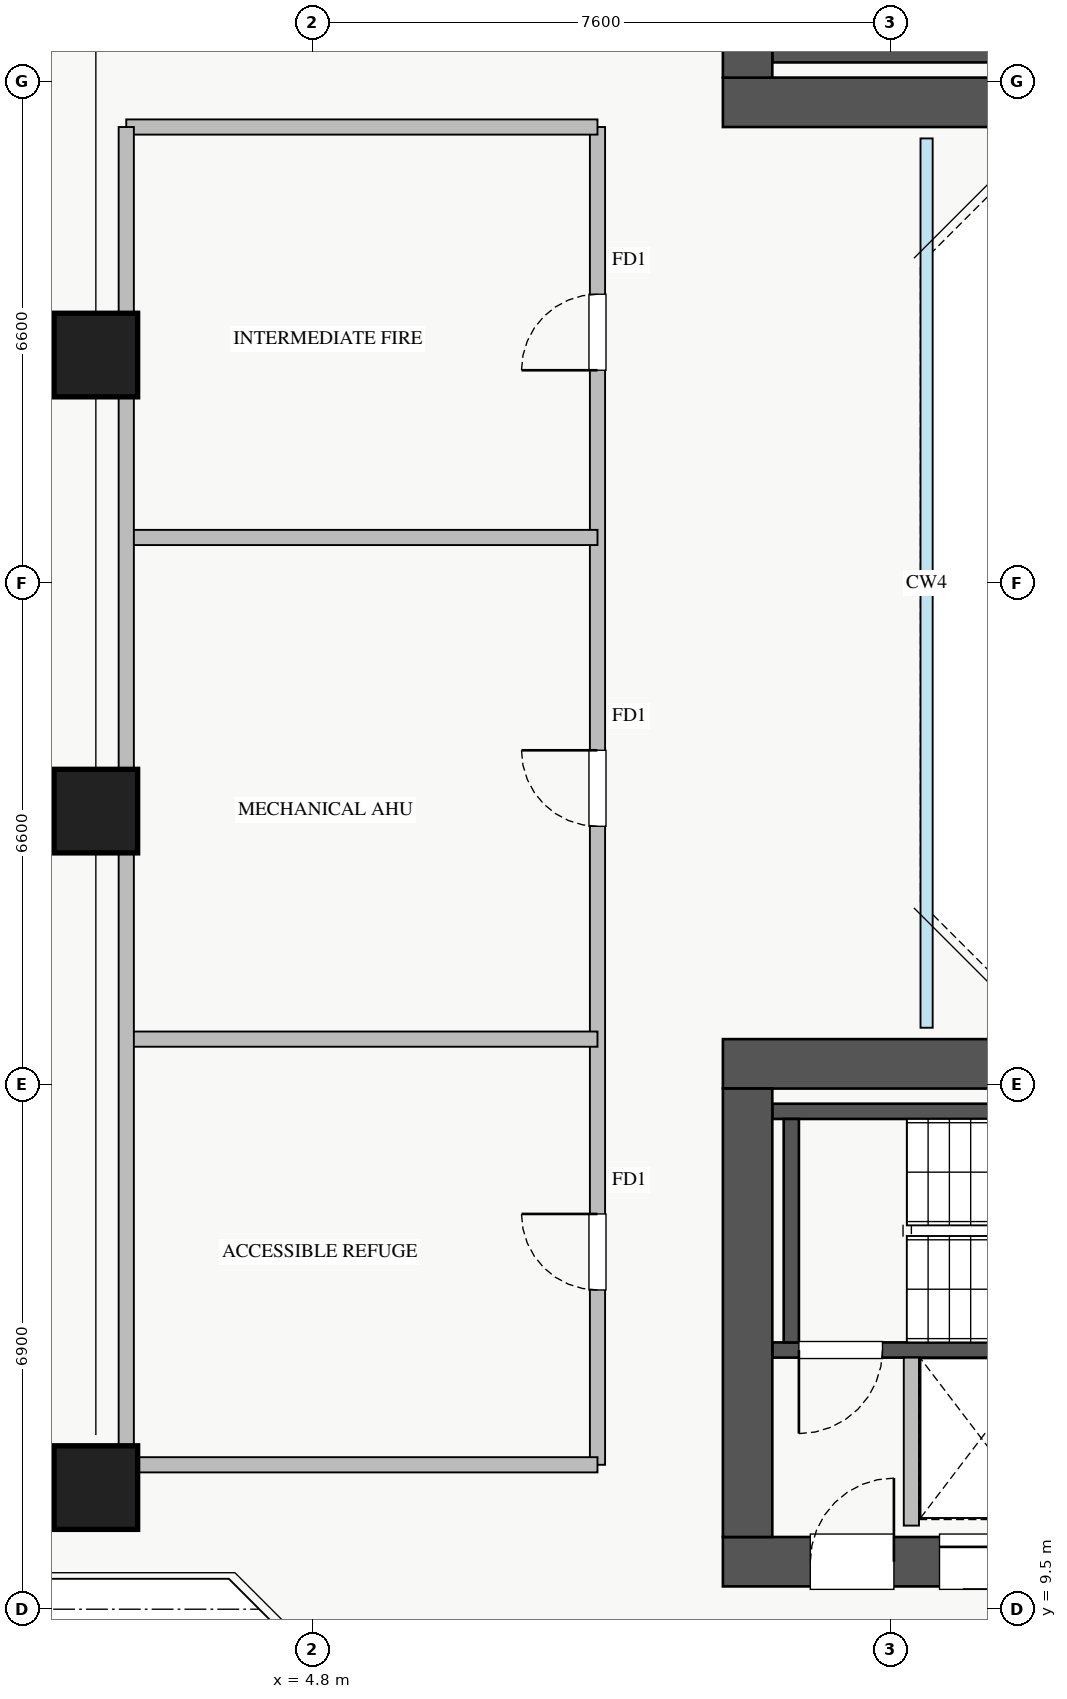
"""IFC4 building model, lengths in metres.
Left out: names, types, materials, properties, quantities, classifications, styles, units other than length and angle.
Written with IfcOpenShell. Run it as: python <this file> out.ifc"""

import sys

from ifc_helpers import new_model, si_unit, direction, frame, frame_2d, origin, origin_2d, place, context, subcontext, project, spatial, rectangle, extrude, source, transform, mapped, element, fill, save


model = new_model("IFC4")
c1 = context("Model", 3, precision=1e-05, world=origin(), true_north=direction((0.0, 1.0)))
c2 = subcontext(c1, "Body", "Model", "MODEL_VIEW")
j1 = project(units=[si_unit("LENGTHUNIT", "METRE"), si_unit("PLANEANGLEUNIT", "RADIAN")], contexts=[c1])
p1 = place(None, origin())
s1 = spatial("IfcSite", under=j1, at=p1, CompositionType="ELEMENT")
p2 = place(p1, origin())
s2 = spatial("IfcBuilding", under=s1, at=p2, CompositionType="ELEMENT")
p3 = place(p2, frame((0.0, 0.0, 139.25)))
s3 = spatial("IfcBuildingStorey", under=s2, at=p3, CompositionType="ELEMENT", Elevation=139.25)
p4 = place(p3, frame((12.68, 12.8, 0.0), z_axis=(0.0, 0.0, 1.0), x_axis=(1.0, 0.0, 0.0)))
e1 = element("IfcWall", 1, at=p4, inside=s3, PredefinedType="SHEAR", context=c2, shape_type="SweptSolid", body=[
    extrude(rectangle(XDim=1.94, YDim=0.18, at=frame_2d((0.97, 0.0))), origin(), (0.0, 0.0, 1.0), 4.32),
])
p5 = place(p3, frame((10.85, 29.95, 0.0), z_axis=(0.0, 0.0, 1.0), x_axis=(1.0, 0.0, 0.0)))
e2 = element("IfcWall", 2, at=p5, inside=s3, PredefinedType="SHEAR", context=c2, shape_type="SweptSolid", body=[
    extrude(rectangle(XDim=7.3, YDim=0.2, at=frame_2d((3.65, 0.0))), origin(), (0.0, 0.0, 1.0), 4.5),
])
p6 = place(p3, frame((10.85, 12.91, 0.0), z_axis=(0.0, 0.0, 1.0), x_axis=(1.0, 0.0, 0.0)))
e3 = element("IfcWall", 3, at=p6, inside=s3, PredefinedType="SHEAR", context=c2, shape_type="SweptSolid", body=[
    extrude(rectangle(XDim=7.3, YDim=0.2, at=frame_2d((3.65, 0.0))), origin(), (0.0, 0.0, 1.0), 4.5),
])
p7 = place(p6, frame((0.35, 0.0, 0.0)))
e4 = element("IfcOpeningElement", 4, at=p7, cuts=e3, PredefinedType="OPENING", context=c2, shape_type="SweptSolid", body=[
    extrude(rectangle(XDim=1.1, YDim=2.05, at=frame_2d((0.55, 1.025))), frame((0.0, 0.11, 0.0), z_axis=(0.0, -1.0, 0.0), x_axis=(1.0, 0.0, 0.0)), (0.0, 0.0, 1.0), 0.22),
])
p8 = place(p3, frame((10.85, 16.05, 0.0), z_axis=(0.0, 0.0, 1.0), x_axis=(1.0, 0.0, 0.0)))
e5 = element("IfcWall", 5, at=p8, inside=s3, PredefinedType="SHEAR", context=c2, shape_type="SweptSolid", body=[
    extrude(rectangle(XDim=7.3, YDim=0.2, at=frame_2d((3.65, 0.0))), origin(), (0.0, 0.0, 1.0), 4.5),
])
p9 = place(p3, frame((11.1, 13.01, 0.0), z_axis=(0.0, 0.0, 1.0), x_axis=(0.0, 1.0, 0.0)))
e6 = element("IfcWall", 6, at=p9, inside=s3, PredefinedType="SHEAR", context=c2, shape_type="SweptSolid", body=[
    extrude(rectangle(XDim=2.94, YDim=0.2, at=frame_2d((1.47, 0.0))), origin(), (0.0, 0.0, 1.0), 4.5),
])
p10 = place(p3, frame((10.2, 29.325, 0.0), z_axis=(0.0, 0.0, 1.0), x_axis=(1.0, 0.0, 0.0)))
e7 = element("IfcWall", 7, at=p10, inside=s3, PredefinedType="SHEAR", context=c2, shape_type="SweptSolid", body=[
    extrude(rectangle(XDim=17.6, YDim=0.65, at=frame_2d((8.8, 0.0))), origin(), (0.0, 0.0, 1.0), 4.5),
])
p11 = place(p3, frame((10.525, 29.65, 0.0), z_axis=(0.0, 0.0, 1.0), x_axis=(0.0, 1.0, 0.0)))
e8 = element("IfcWall", 8, at=p11, inside=s3, PredefinedType="SHEAR", context=c2, shape_type="SweptSolid", body=[
    extrude(rectangle(XDim=5.9, YDim=0.65, at=frame_2d((2.95, 0.0))), origin(), (0.0, 0.0, 1.0), 4.5),
])
p12 = place(p3, frame((10.2, 10.125, 0.0), z_axis=(0.0, 0.0, 1.0), x_axis=(1.0, 0.0, 0.0)))
e9 = element("IfcWall", 9, at=p12, inside=s3, PredefinedType="SHEAR", context=c2, shape_type="SweptSolid", body=[
    extrude(rectangle(XDim=17.6, YDim=0.65, at=frame_2d((8.8, 0.0))), origin(), (0.0, 0.0, 1.0), 4.5),
])
p13 = place(p12, frame((1.15, 0.0, 0.0)))
e10 = element("IfcOpeningElement", 10, at=p13, cuts=e9, PredefinedType="OPENING", context=c2, shape_type="SweptSolid", body=[
    extrude(rectangle(XDim=1.1, YDim=2.05, at=frame_2d((0.55, 1.025))), frame((0.0, 0.335, 0.0), z_axis=(0.0, -1.0, 0.0), x_axis=(1.0, 0.0, 0.0)), (0.0, 0.0, 1.0), 0.67),
])
p14 = place(p12, frame((8.3, 0.0, 0.0)))
e11 = element("IfcOpeningElement", 11, at=p14, cuts=e9, PredefinedType="OPENING", context=c2, shape_type="SweptSolid", body=[
    extrude(rectangle(XDim=1.1, YDim=2.05, at=frame_2d((0.55, 1.025))), frame((0.0, 0.335, 0.0), z_axis=(0.0, -1.0, 0.0), x_axis=(1.0, 0.0, 0.0)), (0.0, 0.0, 1.0), 0.67),
])
p15 = place(p12, frame((4.9, 0.0, 0.0)))
e12 = element("IfcOpeningElement", 12, at=p15, cuts=e9, PredefinedType="OPENING", context=c2, shape_type="SweptSolid", body=[
    extrude(rectangle(XDim=1.1, YDim=2.05, at=frame_2d((0.55, 1.025))), frame((0.0, 0.335, 0.0), z_axis=(0.0, -1.0, 0.0), x_axis=(1.0, 0.0, 0.0)), (0.0, 0.0, 1.0), 0.67),
])
p16 = place(p12, frame((2.85, 0.0, 0.0)))
e13 = element("IfcOpeningElement", 13, at=p16, cuts=e9, PredefinedType="OPENING", context=c2, shape_type="SweptSolid", body=[
    extrude(rectangle(XDim=1.1, YDim=2.05, at=frame_2d((0.55, 1.025))), frame((0.0, 0.335, 0.0), z_axis=(0.0, -1.0, 0.0), x_axis=(1.0, 0.0, 0.0)), (0.0, 0.0, 1.0), 0.67),
])
p17 = place(p12, frame((14.74, 0.0, 0.0)))
e14 = element("IfcOpeningElement", 14, at=p17, cuts=e9, PredefinedType="OPENING", context=c2, shape_type="SweptSolid", body=[
    extrude(rectangle(XDim=1.0, YDim=2.05, at=frame_2d((0.5, 1.025))), frame((0.0, 0.335, 0.0), z_axis=(0.0, -1.0, 0.0), x_axis=(1.0, 0.0, 0.0)), (0.0, 0.0, 1.0), 0.67),
])
p18 = place(p12, frame((10.64, 0.0, 0.0)))
e15 = element("IfcOpeningElement", 15, at=p18, cuts=e9, PredefinedType="OPENING", context=c2, shape_type="SweptSolid", body=[
    extrude(rectangle(XDim=1.0, YDim=2.05, at=frame_2d((0.5, 1.025))), frame((0.0, 0.335, 0.0), z_axis=(0.0, -1.0, 0.0), x_axis=(1.0, 0.0, 0.0)), (0.0, 0.0, 1.0), 0.67),
])
p19 = place(p12, frame((13.09, 0.0, 0.0)))
e16 = element("IfcOpeningElement", 16, at=p19, cuts=e9, PredefinedType="OPENING", context=c2, shape_type="SweptSolid", body=[
    extrude(rectangle(XDim=1.0, YDim=2.05, at=frame_2d((0.5, 1.025))), frame((0.0, 0.335, 0.0), z_axis=(0.0, -1.0, 0.0), x_axis=(1.0, 0.0, 0.0)), (0.0, 0.0, 1.0), 0.67),
])
p20 = place(p3, frame((10.2, 16.675, 0.0), z_axis=(0.0, 0.0, 1.0), x_axis=(1.0, 0.0, 0.0)))
e17 = element("IfcWall", 17, at=p20, inside=s3, PredefinedType="SHEAR", context=c2, shape_type="SweptSolid", body=[
    extrude(rectangle(XDim=17.6, YDim=0.65, at=frame_2d((8.8, 0.0))), origin(), (0.0, 0.0, 1.0), 4.5),
])
p21 = place(p3, frame((10.525, 10.45, 0.0), z_axis=(0.0, 0.0, 1.0), x_axis=(0.0, 1.0, 0.0)))
e18 = element("IfcWall", 18, at=p21, inside=s3, PredefinedType="SHEAR", context=c2, shape_type="SweptSolid", body=[
    extrude(rectangle(XDim=5.9, YDim=0.65, at=frame_2d((2.95, 0.0))), origin(), (0.0, 0.0, 1.0), 4.5),
])
m1 = source(origin(), c2, "Body", "SweptSolid", [
    extrude(rectangle(XDim=1.1, YDim=1.1, at=origin_2d()), origin(), (0.0, 0.0, 1.0), 4.5),
])
for number, where, z_axis, x_axis in (
    (19, (1.95, 26.0, 0.0), (0.0, 0.0, 1.0), (1.0, 0.0, 0.0)),
    (20, (1.95, 20.0, 0.0), (0.0, 0.0, 1.0), (1.0, 0.0, 0.0)),
    (21, (1.95, 11.1, 0.0), (0.0, 0.0, 1.0), (1.0, 0.0, 0.0)),
):
    element("IfcColumn", number, at=place(p3, frame(where, z_axis=z_axis, x_axis=x_axis)), inside=s3, PredefinedType="COLUMN", context=c2, shape_type="MappedRepresentation", body=[
        mapped(m1, transform((0.0, 0.0, 0.0), x_axis=(1.0, 0.0, 0.0), y_axis=(0.0, 1.0, 0.0), z_axis=(0.0, 0.0, 1.0), scale=1.0)),
    ])
p22 = place(p3, frame((12.68, 10.6, 0.0), z_axis=(0.0, 0.0, 1.0), x_axis=(0.0, 1.0, 0.0)))
e22 = element("IfcWall", 22, at=p22, inside=s3, PredefinedType="PARTITIONING", context=c2, shape_type="SweptSolid", body=[
    extrude(rectangle(XDim=2.21, YDim=0.2, at=frame_2d((1.105, 0.0))), origin(), (0.0, 0.0, 1.0), 4.32),
])
p23 = place(p3, frame((8.55, 11.4, 0.0), z_axis=(0.0, 0.0, 1.0), x_axis=(0.0, 1.0, 0.0)))
e23 = element("IfcWall", 23, at=p23, inside=s3, PredefinedType="PARTITIONING", context=c2, shape_type="SweptSolid", body=[
    extrude(rectangle(XDim=17.6, YDim=0.2, at=frame_2d((8.8, 0.0))), origin(), (0.0, 0.0, 1.0), 4.32),
])
p24 = place(p23, frame((8.4, 0.0, 0.0)))
e24 = element("IfcOpeningElement", 24, at=p24, cuts=e23, PredefinedType="OPENING", context=c2, shape_type="SweptSolid", body=[
    extrude(rectangle(XDim=1.0, YDim=2.05, at=frame_2d((0.5, 1.025))), frame((0.0, 0.11, 0.0), z_axis=(0.0, -1.0, 0.0), x_axis=(1.0, 0.0, 0.0)), (0.0, 0.0, 1.0), 0.22),
])
p25 = place(p23, frame((14.4, 0.0, 0.0)))
e25 = element("IfcOpeningElement", 25, at=p25, cuts=e23, PredefinedType="OPENING", context=c2, shape_type="SweptSolid", body=[
    extrude(rectangle(XDim=1.0, YDim=2.05, at=frame_2d((0.5, 1.025))), frame((0.0, 0.11, 0.0), z_axis=(0.0, -1.0, 0.0), x_axis=(1.0, 0.0, 0.0)), (0.0, 0.0, 1.0), 0.22),
])
p26 = place(p23, frame((2.3, 0.0, 0.0)))
e26 = element("IfcOpeningElement", 26, at=p26, cuts=e23, PredefinedType="OPENING", context=c2, shape_type="SweptSolid", body=[
    extrude(rectangle(XDim=1.0, YDim=2.05, at=frame_2d((0.5, 1.025))), frame((0.0, 0.11, 0.0), z_axis=(0.0, -1.0, 0.0), x_axis=(1.0, 0.0, 0.0)), (0.0, 0.0, 1.0), 0.22),
])
p27 = place(p3, frame((2.35, 11.4, 0.0), z_axis=(0.0, 0.0, 1.0), x_axis=(1.0, 0.0, 0.0)))
e27 = element("IfcWall", 27, at=p27, inside=s3, PredefinedType="PARTITIONING", context=c2, shape_type="SweptSolid", body=[
    extrude(rectangle(XDim=6.2, YDim=0.2, at=frame_2d((3.1, 0.0))), origin(), (0.0, 0.0, 1.0), 3.515),
])
for number, where, z_axis, x_axis in (
    (28, (2.35, 17.0, 0.0), (0.0, 0.0, 1.0), (1.0, 0.0, 0.0)),
    (29, (2.35, 23.6, 0.0), (0.0, 0.0, 1.0), (1.0, 0.0, 0.0)),
    (30, (2.35, 29.0, 0.0), (0.0, 0.0, 1.0), (1.0, 0.0, 0.0)),
):
    element("IfcWall", number, at=place(p3, frame(where, z_axis=z_axis, x_axis=x_axis)), inside=s3, PredefinedType="PARTITIONING", context=c2, shape_type="SweptSolid", body=[
        extrude(rectangle(XDim=6.2, YDim=0.2, at=frame_2d((3.1, 0.0))), origin(), (0.0, 0.0, 1.0), 4.32),
    ])
p28 = place(p3, frame((2.35, 11.4, 0.0), z_axis=(0.0, 0.0, 1.0), x_axis=(0.0, 1.0, 0.0)))
e31 = element("IfcWall", 31, at=p28, inside=s3, PredefinedType="PARTITIONING", context=c2, shape_type="SweptSolid", body=[
    extrude(rectangle(XDim=17.6, YDim=0.2, at=frame_2d((8.8, 0.0))), origin(), (0.0, 0.0, 1.0), 4.32),
])
m2 = source(origin(), c2, "Body", "SweptSolid", [
    extrude(rectangle(XDim=1.1, YDim=2.05, at=frame_2d((0.55, 1.025))), frame((0.0, 0.025, 0.0), z_axis=(0.0, -1.0, 0.0), x_axis=(1.0, 0.0, 0.0)), (0.0, 0.0, 1.0), 0.05),
])
p29 = place(p13, origin())
e32 = element("IfcDoor", 32, at=p29, inside=s3, OperationType="SINGLE_SWING_RIGHT", PredefinedType="DOOR", context=c2, shape_type="MappedRepresentation", body=[
    mapped(m2, transform((0.0, 0.0, 0.0), x_axis=(1.0, 0.0, 0.0), y_axis=(0.0, 1.0, 0.0), z_axis=(0.0, 0.0, 1.0), scale=1.0)),
])
fill(e10, e32)
p30 = place(p7, frame((1.1, 0.0, 0.0), z_axis=(0.0, 0.0, 1.0), x_axis=(-1.0, 0.0, 0.0)))
e33 = element("IfcDoor", 33, at=p30, inside=s3, OperationType="SINGLE_SWING_LEFT", PredefinedType="DOOR", context=c2, shape_type="MappedRepresentation", body=[
    mapped(m2, transform((0.0, 0.0, 0.0), x_axis=(1.0, 0.0, 0.0), y_axis=(0.0, 1.0, 0.0), z_axis=(0.0, 0.0, 1.0), scale=1.0)),
])
fill(e4, e33)
p31 = place(p16, origin())
e34 = element("IfcDoor", 34, at=p31, inside=s3, OperationType="SLIDING_TO_RIGHT", PredefinedType="DOOR", context=c2, shape_type="MappedRepresentation", body=[
    mapped(m2, transform((0.0, 0.0, 0.0), x_axis=(1.0, 0.0, 0.0), y_axis=(0.0, 1.0, 0.0), z_axis=(0.0, 0.0, 1.0), scale=1.0)),
])
fill(e13, e34)
m3 = source(origin(), c2, "Body", "SweptSolid", [
    extrude(rectangle(XDim=1.0, YDim=2.05, at=frame_2d((0.5, 1.025))), frame((0.0, 0.025, 0.0), z_axis=(0.0, -1.0, 0.0), x_axis=(1.0, 0.0, 0.0)), (0.0, 0.0, 1.0), 0.05),
])
p32 = place(p24, origin())
e35 = element("IfcDoor", 35, at=p32, inside=s3, OperationType="SINGLE_SWING_RIGHT", PredefinedType="DOOR", context=c2, shape_type="MappedRepresentation", body=[
    mapped(m3, transform((0.0, 0.0, 0.0), x_axis=(1.0, 0.0, 0.0), y_axis=(0.0, 1.0, 0.0), z_axis=(0.0, 0.0, 1.0), scale=1.0)),
])
fill(e24, e35)
p33 = place(p25, origin())
e36 = element("IfcDoor", 36, at=p33, inside=s3, OperationType="SINGLE_SWING_LEFT", PredefinedType="DOOR", context=c2, shape_type="MappedRepresentation", body=[
    mapped(m3, transform((0.0, 0.0, 0.0), x_axis=(1.0, 0.0, 0.0), y_axis=(0.0, 1.0, 0.0), z_axis=(0.0, 0.0, 1.0), scale=1.0)),
])
fill(e25, e36)
p34 = place(p26, origin())
e37 = element("IfcDoor", 37, at=p34, inside=s3, OperationType="SINGLE_SWING_RIGHT", PredefinedType="DOOR", context=c2, shape_type="MappedRepresentation", body=[
    mapped(m3, transform((0.0, 0.0, 0.0), x_axis=(1.0, 0.0, 0.0), y_axis=(0.0, 1.0, 0.0), z_axis=(0.0, 0.0, 1.0), scale=1.0)),
])
fill(e26, e37)
save(model, sys.argv[1])
